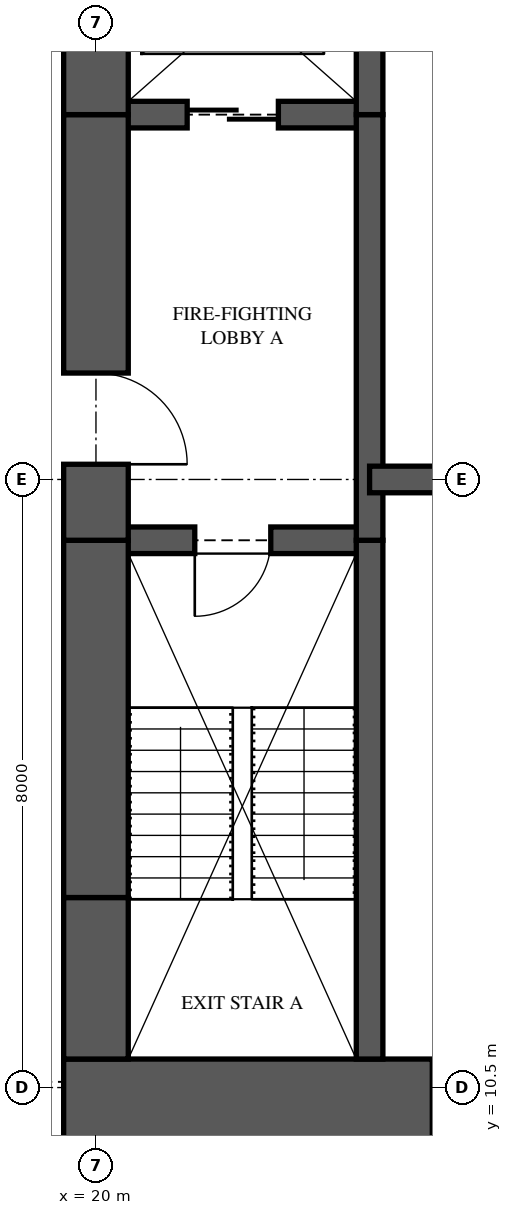
"""IFC4 building model, lengths in metres.
Left out: names, types, materials, properties, quantities, classifications, styles, units other than length and angle.
Written with IfcOpenShell. Run it as: python <this file> out.ifc"""

import sys

from ifc_helpers import new_model, si_unit, direction, frame, frame_2d, origin, place, context, subcontext, project, spatial, rectangle, extrude, element, fill, save


model = new_model("IFC4")
c1 = context("Model", 3, precision=1e-05, world=origin(), true_north=direction((0.0, 1.0)))
c2 = subcontext(c1, "Body", "Model", "MODEL_VIEW")
j1 = project(units=[si_unit("LENGTHUNIT", "METRE"), si_unit("PLANEANGLEUNIT", "RADIAN")], contexts=[c1])
p1 = place(None, origin())
s1 = spatial("IfcSite", under=j1, at=p1, CompositionType="ELEMENT")
p2 = place(p1, origin())
s2 = spatial("IfcBuilding", under=s1, at=p2, CompositionType="ELEMENT")
p3 = place(p2, frame((0.0, 0.0, 114.9)))
s3 = spatial("IfcBuildingStorey", under=s2, at=p3, CompositionType="ELEMENT", Elevation=114.9)
p4 = place(p3, frame((19.575, 10.125, 0.0), z_axis=(0.0, 0.0, 1.0), x_axis=(1.0, 0.0, 0.0)))
e1 = element("IfcWall", 1, at=p4, inside=s3, PredefinedType="SHEAR", context=c2, shape_type="SweptSolid", body=[
    extrude(rectangle(XDim=6.425, YDim=1.5, at=frame_2d((3.212, 0.0))), origin(), (0.0, 0.0, 1.0), 3.35),
])
p5 = place(p4, frame((4.85, 0.0, 0.0)))
e2 = element("IfcOpeningElement", 2, at=p5, cuts=e1, PredefinedType="OPENING", context=c2, shape_type="SweptSolid", body=[
    extrude(rectangle(XDim=0.75, YDim=2.1, at=frame_2d((0.375, 1.05))), frame((0.0, 0.76, 0.0), z_axis=(0.0, -1.0, 0.0), x_axis=(1.0, 0.0, 0.0)), (0.0, 0.0, 1.0), 1.52),
])
p6 = place(p3, frame((20.0, 26.125, 0.0), z_axis=(0.0, 0.0, 1.0), x_axis=(0.0, -1.0, 0.0)))
e3 = element("IfcWall", 3, at=p6, inside=s3, PredefinedType="SHEAR", context=c2, shape_type="SweptSolid", body=[
    extrude(rectangle(XDim=2.825, YDim=0.85, at=frame_2d((1.413, 0.0))), origin(), (0.0, 0.0, 1.0), 3.35),
])
p7 = place(p3, frame((20.0, 23.3, 0.0), z_axis=(0.0, 0.0, 1.0), x_axis=(0.0, -1.0, 0.0)))
e4 = element("IfcWall", 4, at=p7, inside=s3, PredefinedType="SHEAR", context=c2, shape_type="SweptSolid", body=[
    extrude(rectangle(XDim=5.6, YDim=0.85, at=frame_2d((2.8, 0.0))), origin(), (0.0, 0.0, 1.0), 3.35),
])
p8 = place(p7, frame((3.4, 0.0, 0.0)))
e5 = element("IfcOpeningElement", 5, at=p8, cuts=e4, PredefinedType="OPENING", context=c2, shape_type="SweptSolid", body=[
    extrude(rectangle(XDim=1.2, YDim=2.2, at=frame_2d((0.6, 1.1))), frame((0.0, 0.435, 0.0), z_axis=(0.0, -1.0, 0.0), x_axis=(1.0, 0.0, 0.0)), (0.0, 0.0, 1.0), 0.87),
])
p9 = place(p3, frame((20.0, 17.7, 0.0), z_axis=(0.0, 0.0, 1.0), x_axis=(0.0, -1.0, 0.0)))
e6 = element("IfcWall", 6, at=p9, inside=s3, PredefinedType="SHEAR", context=c2, shape_type="SweptSolid", body=[
    extrude(rectangle(XDim=4.7, YDim=0.85, at=frame_2d((2.35, 0.0))), origin(), (0.0, 0.0, 1.0), 3.35),
])
p10 = place(p3, frame((20.0, 13.0, 0.0), z_axis=(0.0, 0.0, 1.0), x_axis=(0.0, -1.0, 0.0)))
e7 = element("IfcWall", 7, at=p10, inside=s3, PredefinedType="SHEAR", context=c2, shape_type="SweptSolid", body=[
    extrude(rectangle(XDim=2.125, YDim=0.85, at=frame_2d((1.062, 0.0))), origin(), (0.0, 0.0, 1.0), 3.35),
])
p11 = place(p3, frame((23.6, 10.875, 0.0), z_axis=(0.0, 0.0, 1.0), x_axis=(0.0, 1.0, 0.0)))
e8 = element("IfcWall", 8, at=p11, inside=s3, PredefinedType="SHEAR", context=c2, shape_type="SweptSolid", body=[
    extrude(rectangle(XDim=6.825, YDim=0.35, at=frame_2d((3.413, 0.0))), origin(), (0.0, 0.0, 1.0), 3.35),
])
p12 = place(p3, frame((23.6, 17.7, 0.0), z_axis=(0.0, 0.0, 1.0), x_axis=(0.0, 1.0, 0.0)))
e9 = element("IfcWall", 9, at=p12, inside=s3, PredefinedType="SHEAR", context=c2, shape_type="SweptSolid", body=[
    extrude(rectangle(XDim=5.6, YDim=0.35, at=frame_2d((2.8, 0.0))), origin(), (0.0, 0.0, 1.0), 3.35),
])
p13 = place(p3, frame((23.6, 23.3, 0.0), z_axis=(0.0, 0.0, 1.0), x_axis=(0.0, 1.0, 0.0)))
e10 = element("IfcWall", 10, at=p13, inside=s3, PredefinedType="SHEAR", context=c2, shape_type="SweptSolid", body=[
    extrude(rectangle(XDim=2.825, YDim=0.35, at=frame_2d((1.413, 0.0))), origin(), (0.0, 0.0, 1.0), 3.35),
])
p14 = place(p3, frame((20.0, 17.7, 0.0), z_axis=(0.0, 0.0, 1.0), x_axis=(1.0, 0.0, 0.0)))
e11 = element("IfcWall", 11, at=p14, inside=s3, PredefinedType="SHEAR", context=c2, shape_type="SweptSolid", body=[
    extrude(rectangle(XDim=3.6, YDim=0.35, at=frame_2d((1.8, 0.0))), origin(), (0.0, 0.0, 1.0), 3.35),
])
p15 = place(p14, frame((1.3, 0.0, 0.0)))
e12 = element("IfcOpeningElement", 12, at=p15, cuts=e11, PredefinedType="OPENING", context=c2, shape_type="SweptSolid", body=[
    extrude(rectangle(XDim=1.0, YDim=2.1, at=frame_2d((0.5, 1.05))), frame((0.0, 0.185, 0.0), z_axis=(0.0, -1.0, 0.0), x_axis=(1.0, 0.0, 0.0)), (0.0, 0.0, 1.0), 0.37),
])
p16 = place(p3, frame((20.0, 23.3, 0.0), z_axis=(0.0, 0.0, 1.0), x_axis=(1.0, 0.0, 0.0)))
e13 = element("IfcWall", 13, at=p16, inside=s3, PredefinedType="SHEAR", context=c2, shape_type="SweptSolid", body=[
    extrude(rectangle(XDim=3.6, YDim=0.35, at=frame_2d((1.8, 0.0))), origin(), (0.0, 0.0, 1.0), 3.35),
])
p17 = place(p16, frame((1.2, 0.0, 0.0)))
e14 = element("IfcOpeningElement", 14, at=p17, cuts=e13, PredefinedType="OPENING", context=c2, shape_type="SweptSolid", body=[
    extrude(rectangle(XDim=1.2, YDim=2.1, at=frame_2d((0.6, 1.05))), frame((0.0, 0.185, 0.0), z_axis=(0.0, -1.0, 0.0), x_axis=(1.0, 0.0, 0.0)), (0.0, 0.0, 1.0), 0.37),
])
p18 = place(p3, frame((23.6, 18.5, 0.0), z_axis=(0.0, 0.0, 1.0), x_axis=(1.0, 0.0, 0.0)))
e15 = element("IfcWall", 15, at=p18, inside=s3, PredefinedType="SHEAR", context=c2, shape_type="SweptSolid", body=[
    extrude(rectangle(XDim=2.4, YDim=0.35, at=frame_2d((1.2, 0.0))), origin(), (0.0, 0.0, 1.0), 3.35),
])
p19 = place(p15, frame((1.0, 0.0, 0.0), z_axis=(0.0, 0.0, 1.0), x_axis=(-1.0, 0.0, 0.0)))
e16 = element("IfcDoor", 16, at=p19, inside=s3, OperationType="SINGLE_SWING_RIGHT", PredefinedType="DOOR", context=c2, shape_type="SweptSolid", body=[
    extrude(rectangle(XDim=1.0, YDim=2.1, at=frame_2d((0.5, 1.05))), frame((0.0, 0.025, 0.0), z_axis=(0.0, -1.0, 0.0), x_axis=(1.0, 0.0, 0.0)), (0.0, 0.0, 1.0), 0.05),
])
fill(e12, e16)
p20 = place(p8, origin())
e17 = element("IfcDoor", 17, at=p20, inside=s3, OperationType="SINGLE_SWING_RIGHT", PredefinedType="DOOR", context=c2, shape_type="SweptSolid", body=[
    extrude(rectangle(XDim=1.2, YDim=2.2, at=frame_2d((0.6, 1.1))), frame((0.0, 0.025, 0.0), z_axis=(0.0, -1.0, 0.0), x_axis=(1.0, 0.0, 0.0)), (0.0, 0.0, 1.0), 0.05),
])
fill(e5, e17)
p21 = place(p17, origin())
e18 = element("IfcDoor", 18, at=p21, inside=s3, OperationType="SLIDING_TO_LEFT", PredefinedType="DOOR", context=c2, shape_type="SweptSolid", body=[
    extrude(rectangle(XDim=1.2, YDim=2.1, at=frame_2d((0.6, 1.05))), frame((0.0, 0.025, 0.0), z_axis=(0.0, -1.0, 0.0), x_axis=(1.0, 0.0, 0.0)), (0.0, 0.0, 1.0), 0.05),
])
fill(e14, e18)
save(model, sys.argv[1])
